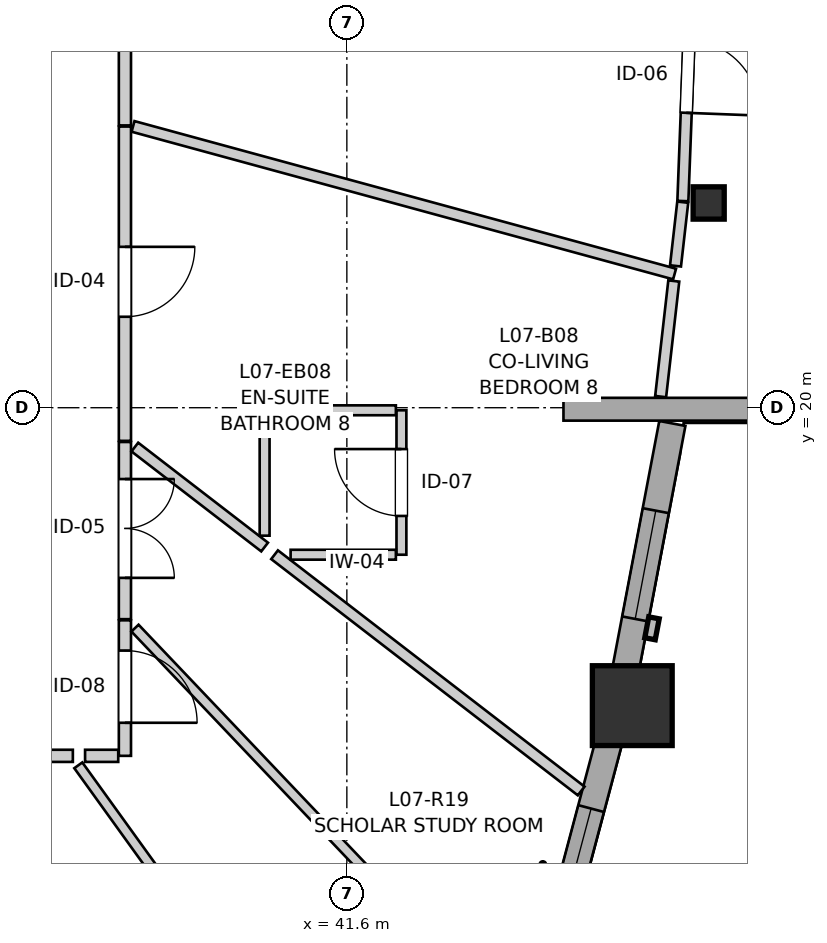
"""IFC4 building model, lengths in metres.
Left out: names, types, materials, properties, quantities, classifications, styles, units other than length and angle.
Written with IfcOpenShell. Run it as: python <this file> out.ifc"""

import sys

from ifc_helpers import new_model, si_unit, direction, frame, frame_2d, origin, origin_2d, place, context, subcontext, project, spatial, rectangle, i_section, extrude, source, transform, mapped, element, fill, save


model = new_model("IFC4")
c1 = context("Model", 3, precision=1e-05, world=origin(), true_north=direction((0.0, 1.0)))
c2 = subcontext(c1, "Body", "Model", "MODEL_VIEW")
j1 = project(units=[si_unit("LENGTHUNIT", "METRE"), si_unit("PLANEANGLEUNIT", "RADIAN")], contexts=[c1])
p1 = place(None, origin())
s1 = spatial("IfcSite", under=j1, at=p1, CompositionType="ELEMENT")
p2 = place(p1, origin())
s2 = spatial("IfcBuilding", under=s1, at=p2, CompositionType="ELEMENT")
p3 = place(p2, frame((0.0, 0.0, 27.0)))
s3 = spatial("IfcBuildingStorey", under=s2, at=p3, CompositionType="ELEMENT", Elevation=27.0)
m1 = source(origin(), c2, "Body", "SweptSolid", [
    extrude(rectangle(XDim=1.05, YDim=1.05, at=origin_2d()), origin(), (0.0, 0.0, 1.0), 2.935),
])
p4 = place(p3, frame((45.355, 16.081, 0.0), z_axis=(0.0, 0.0, 1.0), x_axis=(1.0, 0.0, 0.0)))
e1 = element("IfcColumn", 1, at=p4, inside=s3, PredefinedType="COLUMN", context=c2, shape_type="MappedRepresentation", body=[
    mapped(m1, transform((0.0, 0.0, 0.0), x_axis=(1.0, 0.0, 0.0), y_axis=(0.0, 1.0, 0.0), z_axis=(0.0, 0.0, 1.0), scale=1.0)),
])
m2 = source(origin(), c2, "Body", "SweptSolid", [
    extrude(i_section(OverallWidth=0.409, OverallDepth=0.425, WebThickness=0.03, FlangeThickness=0.048, FilletRadius=0.015, at=origin_2d()), origin(), (0.0, 0.0, 1.0), 2.935),
])
p5 = place(p3, frame((46.361, 22.694, 0.0), z_axis=(0.0, 0.0, 1.0), x_axis=(1.0, 0.0, 0.0)))
e2 = element("IfcColumn", 2, at=p5, inside=s3, PredefinedType="PILASTER", context=c2, shape_type="MappedRepresentation", body=[
    mapped(m2, transform((0.0, 0.0, 0.0), x_axis=(1.0, 0.0, 0.0), y_axis=(0.0, 1.0, 0.0), z_axis=(0.0, 0.0, 1.0), scale=1.0)),
])
p6 = place(p3, frame((44.297, 12.782, 0.0), z_axis=(0.0, 0.0, 1.0), x_axis=(0.257090265476, 0.96638739406, 0.0)))
e3 = element("IfcWall", 3, at=p6, inside=s3, PredefinedType="SOLIDWALL", context=c2, shape_type="SweptSolid", body=[
    extrude(rectangle(XDim=3.159, YDim=0.35, at=frame_2d((1.58, 0.0))), origin(), (0.0, 0.0, 1.0), 2.415),
])
p7 = place(p6, frame((0.261, 0.0, 0.82)))
e4 = element("IfcOpeningElement", 4, at=p7, cuts=e3, PredefinedType="OPENING", context=c2, shape_type="SweptSolid", body=[
    extrude(rectangle(XDim=1.75, YDim=1.3, at=frame_2d((0.875, 0.65))), frame((0.0, 0.185, 0.0), z_axis=(0.0, -1.0, 0.0), x_axis=(1.0, 0.0, 0.0)), (0.0, 0.0, 1.0), 0.37),
])
p8 = place(p3, frame((45.24, 16.408, 0.0), z_axis=(0.0, 0.0, 1.0), x_axis=(0.186636709983, 0.982428999209, 0.0)))
e5 = element("IfcWall", 5, at=p8, inside=s3, PredefinedType="SOLIDWALL", context=c2, shape_type="SweptSolid", body=[
    extrude(rectangle(XDim=3.446, YDim=0.35, at=frame_2d((1.723, 0.0))), origin(), (0.0, 0.0, 1.0), 2.415),
])
p9 = place(p8, frame((0.828, 0.0, 0.82)))
e6 = element("IfcOpeningElement", 6, at=p9, cuts=e5, PredefinedType="OPENING", context=c2, shape_type="SweptSolid", body=[
    extrude(rectangle(XDim=1.45, YDim=1.25, at=frame_2d((0.725, 0.625))), frame((0.0, 0.185, 0.0), z_axis=(0.0, -1.0, 0.0), x_axis=(1.0, 0.0, 0.0)), (0.0, 0.0, 1.0), 0.37),
])
p10 = place(p3, frame((44.45, 19.98, 0.0), z_axis=(0.0, 0.0, 1.0), x_axis=(1.0, 0.0, 0.0)))
e7 = element("IfcWall", 7, at=p10, inside=s3, PredefinedType="SOLIDWALL", context=c2, shape_type="SweptSolid", body=[
    extrude(rectangle(XDim=20.685, YDim=0.3, at=frame_2d((10.342, 0.0))), origin(), (0.0, 0.0, 1.0), 2.115),
])
p11 = place(p3, frame((38.68, 28.445, 0.0), z_axis=(0.0, 0.0, 1.0), x_axis=(0.0, -1.0, 0.0)))
e8 = element("IfcWall", 8, at=p11, inside=s3, PredefinedType="PARTITIONING", context=c2, shape_type="SweptSolid", body=[
    extrude(rectangle(XDim=4.731, YDim=0.16, at=frame_2d((2.365, 0.0))), origin(), (0.0, 0.0, 1.0), 2.935),
])
p12 = place(p11, frame((1.716, 0.0, 0.0)))
e9 = element("IfcOpeningElement", 9, at=p12, cuts=e8, PredefinedType="OPENING", context=c2, shape_type="SweptSolid", body=[
    extrude(rectangle(XDim=1.3, YDim=2.1, at=frame_2d((0.65, 1.05))), frame((0.0, 0.09, 0.0), z_axis=(0.0, -1.0, 0.0), x_axis=(1.0, 0.0, 0.0)), (0.0, 0.0, 1.0), 0.18),
])
p13 = place(p3, frame((38.68, 23.699, 0.0), z_axis=(0.0, 0.0, 1.0), x_axis=(0.0, -1.0, 0.0)))
e10 = element("IfcWall", 10, at=p13, inside=s3, PredefinedType="PARTITIONING", context=c2, shape_type="SweptSolid", body=[
    extrude(rectangle(XDim=4.135, YDim=0.16, at=frame_2d((2.067, 0.0))), origin(), (0.0, 0.0, 1.0), 2.935),
])
p14 = place(p13, frame((1.583, 0.0, 0.0)))
e11 = element("IfcOpeningElement", 11, at=p14, cuts=e10, PredefinedType="OPENING", context=c2, shape_type="SweptSolid", body=[
    extrude(rectangle(XDim=0.92, YDim=2.1, at=frame_2d((0.46, 1.05))), frame((0.0, 0.09, 0.0), z_axis=(0.0, -1.0, 0.0), x_axis=(1.0, 0.0, 0.0)), (0.0, 0.0, 1.0), 0.18),
])
p15 = place(p3, frame((46.146, 25.985, 0.0), z_axis=(0.0, 0.0, 1.0), x_axis=(-0.038094618751, -0.999274136572, 0.0)))
e12 = element("IfcWall", 12, at=p15, inside=s3, PredefinedType="PARTITIONING", context=c2, shape_type="SweptSolid", body=[
    extrude(rectangle(XDim=3.269, YDim=0.145, at=frame_2d((1.634, 0.0))), origin(), (0.0, 0.0, 1.0), 2.403),
])
p16 = place(p15, frame((1.147, 0.0, 0.0)))
e13 = element("IfcOpeningElement", 13, at=p16, cuts=e12, PredefinedType="OPENING", context=c2, shape_type="SweptSolid", body=[
    extrude(rectangle(XDim=0.96, YDim=2.1, at=frame_2d((0.48, 1.05))), frame((0.0, 0.083, 0.0), z_axis=(0.0, -1.0, 0.0), x_axis=(1.0, 0.0, 0.0)), (0.0, 0.0, 1.0), 0.165),
])
p17 = place(p3, frame((37.995, 15.42, 0.0), z_axis=(0.0, 0.0, 1.0), x_axis=(-1.0, 0.0, 0.0)))
e14 = element("IfcWall", 14, at=p17, inside=s3, PredefinedType="PARTITIONING", context=c2, shape_type="SweptSolid", body=[
    extrude(rectangle(XDim=2.9, YDim=0.16, at=frame_2d((1.45, 0.0))), origin(), (0.0, 0.0, 1.0), 2.935),
])
p18 = place(p17, frame((1.014, 0.0, 0.0)))
e15 = element("IfcOpeningElement", 15, at=p18, cuts=e14, PredefinedType="OPENING", context=c2, shape_type="SweptSolid", body=[
    extrude(rectangle(XDim=0.92, YDim=2.1, at=frame_2d((0.46, 1.05))), frame((0.0, 0.09, 0.0), z_axis=(0.0, -1.0, 0.0), x_axis=(1.0, 0.0, 0.0)), (0.0, 0.0, 1.0), 0.18),
])
p19 = place(p3, frame((38.68, 19.549, 0.0), z_axis=(0.0, 0.0, 1.0), x_axis=(0.0, -1.0, 0.0)))
e16 = element("IfcWall", 16, at=p19, inside=s3, PredefinedType="PARTITIONING", context=c2, shape_type="SweptSolid", body=[
    extrude(rectangle(XDim=2.331, YDim=0.16, at=frame_2d((1.166, 0.0))), origin(), (0.0, 0.0, 1.0), 2.935),
])
p20 = place(p19, frame((0.488, 0.0, 0.0)))
e17 = element("IfcOpeningElement", 17, at=p20, cuts=e16, PredefinedType="OPENING", context=c2, shape_type="SweptSolid", body=[
    extrude(rectangle(XDim=1.3, YDim=2.1, at=frame_2d((0.65, 1.05))), frame((0.0, 0.09, 0.0), z_axis=(0.0, -1.0, 0.0), x_axis=(1.0, 0.0, 0.0)), (0.0, 0.0, 1.0), 0.18),
])
p21 = place(p3, frame((42.318, 18.066, 0.0), z_axis=(0.0, 0.0, 1.0), x_axis=(0.0, 1.0, 0.0)))
e18 = element("IfcWall", 18, at=p21, inside=s3, PredefinedType="PARTITIONING", context=c2, shape_type="SweptSolid", body=[
    extrude(rectangle(XDim=1.9, YDim=0.13, at=frame_2d((0.95, 0.0))), origin(), (0.0, 0.0, 1.0), 2.935),
])
p22 = place(p21, frame((0.51, 0.0, 0.0)))
e19 = element("IfcOpeningElement", 19, at=p22, cuts=e18, PredefinedType="OPENING", context=c2, shape_type="SweptSolid", body=[
    extrude(rectangle(XDim=0.88, YDim=2.05, at=frame_2d((0.44, 1.025))), frame((0.0, 0.075, 0.0), z_axis=(0.0, -1.0, 0.0), x_axis=(1.0, 0.0, 0.0)), (0.0, 0.0, 1.0), 0.15),
])
p23 = place(p3, frame((38.68, 17.203, 0.0), z_axis=(0.0, 0.0, 1.0), x_axis=(0.0, -1.0, 0.0)))
e20 = element("IfcWall", 20, at=p23, inside=s3, PredefinedType="PARTITIONING", context=c2, shape_type="SweptSolid", body=[
    extrude(rectangle(XDim=1.783, YDim=0.16, at=frame_2d((0.892, 0.0))), origin(), (0.0, 0.0, 1.0), 2.935),
])
p24 = place(p23, frame((0.398, 0.0, 0.0)))
e21 = element("IfcOpeningElement", 21, at=p24, cuts=e20, PredefinedType="OPENING", context=c2, shape_type="SweptSolid", body=[
    extrude(rectangle(XDim=0.95, YDim=2.1, at=frame_2d((0.475, 1.05))), frame((0.0, 0.09, 0.0), z_axis=(0.0, -1.0, 0.0), x_axis=(1.0, 0.0, 0.0)), (0.0, 0.0, 1.0), 0.18),
])
p25 = place(p3, frame((38.067, 15.295, 0.0), z_axis=(0.0, 0.0, 1.0), x_axis=(0.584777320582, -0.811193864211, 0.0)))
e22 = element("IfcWall", 22, at=p25, inside=s3, PredefinedType="PARTITIONING", context=c2, shape_type="SweptSolid", body=[
    extrude(rectangle(XDim=8.164, YDim=0.13, at=frame_2d((4.082, 0.0))), origin(), (0.0, 0.0, 1.0), 2.935),
])
p26 = place(p3, frame((38.787, 23.701, 0.0), z_axis=(0.0, 0.0, 1.0), x_axis=(0.964810342249, -0.262946769308, 0.0)))
e23 = element("IfcWall", 23, at=p26, inside=s3, PredefinedType="PARTITIONING", context=c2, shape_type="SweptSolid", body=[
    extrude(rectangle(XDim=7.385, YDim=0.145, at=frame_2d((3.692, 0.0))), origin(), (0.0, 0.0, 1.0), 2.935),
])
p27 = place(p3, frame((38.812, 17.101, 0.0), z_axis=(0.0, 0.0, 1.0), x_axis=(0.689140556814, -0.724627692649, 0.0)))
e24 = element("IfcWall", 24, at=p27, inside=s3, PredefinedType="PARTITIONING", context=c2, shape_type="SweptSolid", body=[
    extrude(rectangle(XDim=7.217, YDim=0.13, at=frame_2d((3.608, 0.0))), origin(), (0.0, 0.0, 1.0), 2.935),
])
p28 = place(p3, frame((40.649, 18.066, 0.0), z_axis=(0.0, 0.0, 1.0), x_axis=(0.792155051101, -0.610319895641, 0.0)))
e25 = element("IfcWall", 25, at=p28, inside=s3, PredefinedType="PARTITIONING", context=c2, shape_type="SweptSolid", body=[
    extrude(rectangle(XDim=5.093, YDim=0.145, at=frame_2d((2.546, 0.0))), origin(), (0.0, 0.0, 1.0), 2.935),
])
p29 = place(p3, frame((38.811, 19.482, 0.0), z_axis=(0.0, 0.0, 1.0), x_axis=(0.792185877025, -0.61027988353, 0.0)))
e26 = element("IfcWall", 26, at=p29, inside=s3, PredefinedType="PARTITIONING", context=c2, shape_type="SweptSolid", body=[
    extrude(rectangle(XDim=2.156, YDim=0.145, at=frame_2d((1.078, 0.0))), origin(), (0.0, 0.0, 1.0), 2.935),
])
p30 = place(p3, frame((40.518, 19.966, 0.0), z_axis=(0.0, 0.0, 1.0), x_axis=(1.0, 0.0, 0.0)))
e27 = element("IfcWall", 27, at=p30, inside=s3, PredefinedType="PARTITIONING", context=c2, shape_type="SweptSolid", body=[
    extrude(rectangle(XDim=1.727, YDim=0.13, at=frame_2d((0.864, 0.0))), origin(), (0.0, 0.0, 1.0), 2.103),
])
p31 = place(p3, frame((40.518, 18.317, 0.0), z_axis=(0.0, 0.0, 1.0), x_axis=(0.0, 1.0, 0.0)))
e28 = element("IfcWall", 28, at=p31, inside=s3, PredefinedType="PARTITIONING", context=c2, shape_type="SweptSolid", body=[
    extrude(rectangle(XDim=1.576, YDim=0.13, at=frame_2d((0.788, 0.0))), origin(), (0.0, 0.0, 1.0), 2.935),
])
p32 = place(p3, frame((40.86, 18.066, 0.0), z_axis=(0.0, 0.0, 1.0), x_axis=(1.0, 0.0, 0.0)))
e29 = element("IfcWall", 29, at=p32, inside=s3, PredefinedType="PARTITIONING", context=c2, shape_type="SweptSolid", body=[
    extrude(rectangle(XDim=1.385, YDim=0.13, at=frame_2d((0.692, 0.0))), origin(), (0.0, 0.0, 1.0), 2.935),
])
p33 = place(p3, frame((45.729, 20.146, 0.0), z_axis=(0.0, 0.0, 1.0), x_axis=(0.113074294354, 0.993586535716, 0.0)))
e30 = element("IfcWall", 30, at=p33, inside=s3, PredefinedType="PARTITIONING", context=c2, shape_type="SweptSolid", body=[
    extrude(rectangle(XDim=1.531, YDim=0.145, at=frame_2d((0.765, 0.0))), origin(), (0.0, 0.0, 1.0), 2.403),
])
p34 = place(p3, frame((45.924, 21.866, 0.0), z_axis=(0.0, 0.0, 1.0), x_axis=(0.112844765803, 0.993612630169, 0.0)))
e31 = element("IfcWall", 31, at=p34, inside=s3, PredefinedType="PARTITIONING", context=c2, shape_type="SweptSolid", body=[
    extrude(rectangle(XDim=0.844, YDim=0.145, at=frame_2d((0.422, 0.0))), origin(), (0.0, 0.0, 1.0), 2.403),
])
p35 = place(p3, frame((38.156, 15.42, 0.0), z_axis=(0.0, 0.0, 1.0), x_axis=(1.0, 0.0, 0.0)))
e32 = element("IfcWall", 32, at=p35, inside=s3, PredefinedType="PARTITIONING", context=c2, shape_type="SweptSolid", body=[
    extrude(rectangle(XDim=0.436, YDim=0.16, at=frame_2d((0.218, 0.0))), origin(), (0.0, 0.0, 1.0), 2.935),
])
m3 = source(origin(), c2, "Body", "SweptSolid", [
    extrude(rectangle(XDim=1.75, YDim=1.3, at=frame_2d((0.875, 0.65))), frame((0.0, 0.03, 0.0), z_axis=(0.0, -1.0, 0.0), x_axis=(1.0, 0.0, 0.0)), (0.0, 0.0, 1.0), 0.06),
])
p36 = place(p7, origin())
e33 = element("IfcWindow", 33, at=p36, inside=s3, PartitioningType="SINGLE_PANEL", PredefinedType="WINDOW", context=c2, shape_type="MappedRepresentation", body=[
    mapped(m3, transform((0.0, 0.0, 0.0), x_axis=(1.0, 0.0, 0.0), y_axis=(0.0, 1.0, 0.0), z_axis=(0.0, 0.0, 1.0), scale=1.0)),
])
fill(e4, e33)
m4 = source(origin(), c2, "Body", "SweptSolid", [
    extrude(rectangle(XDim=1.45, YDim=1.25, at=frame_2d((0.725, 0.625))), frame((0.0, 0.03, 0.0), z_axis=(0.0, -1.0, 0.0), x_axis=(1.0, 0.0, 0.0)), (0.0, 0.0, 1.0), 0.06),
])
p37 = place(p9, origin())
e34 = element("IfcWindow", 34, at=p37, inside=s3, PartitioningType="SINGLE_PANEL", PredefinedType="WINDOW", context=c2, shape_type="MappedRepresentation", body=[
    mapped(m4, transform((0.0, 0.0, 0.0), x_axis=(1.0, 0.0, 0.0), y_axis=(0.0, 1.0, 0.0), z_axis=(0.0, 0.0, 1.0), scale=1.0)),
])
fill(e6, e34)
m5 = source(origin(), c2, "Body", "SweptSolid", [
    extrude(rectangle(XDim=0.92, YDim=2.1, at=frame_2d((0.46, 1.05))), frame((0.0, 0.025, 0.0), z_axis=(0.0, -1.0, 0.0), x_axis=(1.0, 0.0, 0.0)), (0.0, 0.0, 1.0), 0.05),
])
p38 = place(p14, origin())
e35 = element("IfcDoor", 35, at=p38, inside=s3, OperationType="SINGLE_SWING_LEFT", PredefinedType="DOOR", context=c2, shape_type="MappedRepresentation", body=[
    mapped(m5, transform((0.0, 0.0, 0.0), x_axis=(1.0, 0.0, 0.0), y_axis=(0.0, 1.0, 0.0), z_axis=(0.0, 0.0, 1.0), scale=1.0)),
])
fill(e11, e35)
m6 = source(origin(), c2, "Body", "SweptSolid", [
    extrude(rectangle(XDim=0.96, YDim=2.1, at=frame_2d((0.48, 1.05))), frame((0.0, 0.025, 0.0), z_axis=(0.0, -1.0, 0.0), x_axis=(1.0, 0.0, 0.0)), (0.0, 0.0, 1.0), 0.05),
])
p39 = place(p16, origin())
e36 = element("IfcDoor", 36, at=p39, inside=s3, OperationType="SINGLE_SWING_RIGHT", PredefinedType="DOOR", context=c2, shape_type="MappedRepresentation", body=[
    mapped(m6, transform((0.0, 0.0, 0.0), x_axis=(1.0, 0.0, 0.0), y_axis=(0.0, 1.0, 0.0), z_axis=(0.0, 0.0, 1.0), scale=1.0)),
])
fill(e13, e36)
m7 = source(origin(), c2, "Body", "SweptSolid", [
    extrude(rectangle(XDim=1.3, YDim=2.1, at=frame_2d((0.65, 1.05))), frame((0.0, 0.025, 0.0), z_axis=(0.0, -1.0, 0.0), x_axis=(1.0, 0.0, 0.0)), (0.0, 0.0, 1.0), 0.05),
])
p40 = place(p20, origin())
e37 = element("IfcDoor", 37, at=p40, inside=s3, OperationType="DOUBLE_DOOR_SINGLE_SWING", PredefinedType="DOOR", context=c2, shape_type="MappedRepresentation", body=[
    mapped(m7, transform((0.0, 0.0, 0.0), x_axis=(1.0, 0.0, 0.0), y_axis=(0.0, 1.0, 0.0), z_axis=(0.0, 0.0, 1.0), scale=1.0)),
])
fill(e17, e37)
m8 = source(origin(), c2, "Body", "SweptSolid", [
    extrude(rectangle(XDim=0.88, YDim=2.05, at=frame_2d((0.44, 1.025))), frame((0.0, 0.025, 0.0), z_axis=(0.0, -1.0, 0.0), x_axis=(1.0, 0.0, 0.0)), (0.0, 0.0, 1.0), 0.05),
])
p41 = place(p22, origin())
e38 = element("IfcDoor", 38, at=p41, inside=s3, OperationType="SINGLE_SWING_RIGHT", PredefinedType="DOOR", context=c2, shape_type="MappedRepresentation", body=[
    mapped(m8, transform((0.0, 0.0, 0.0), x_axis=(1.0, 0.0, 0.0), y_axis=(0.0, 1.0, 0.0), z_axis=(0.0, 0.0, 1.0), scale=1.0)),
])
fill(e19, e38)
m9 = source(origin(), c2, "Body", "SweptSolid", [
    extrude(rectangle(XDim=0.95, YDim=2.1, at=frame_2d((0.475, 1.05))), frame((0.0, 0.025, 0.0), z_axis=(0.0, -1.0, 0.0), x_axis=(1.0, 0.0, 0.0)), (0.0, 0.0, 1.0), 0.05),
])
p42 = place(p24, origin())
e39 = element("IfcDoor", 39, at=p42, inside=s3, OperationType="SINGLE_SWING_RIGHT", PredefinedType="DOOR", context=c2, shape_type="MappedRepresentation", body=[
    mapped(m9, transform((0.0, 0.0, 0.0), x_axis=(1.0, 0.0, 0.0), y_axis=(0.0, 1.0, 0.0), z_axis=(0.0, 0.0, 1.0), scale=1.0)),
])
fill(e21, e39)
save(model, sys.argv[1])
